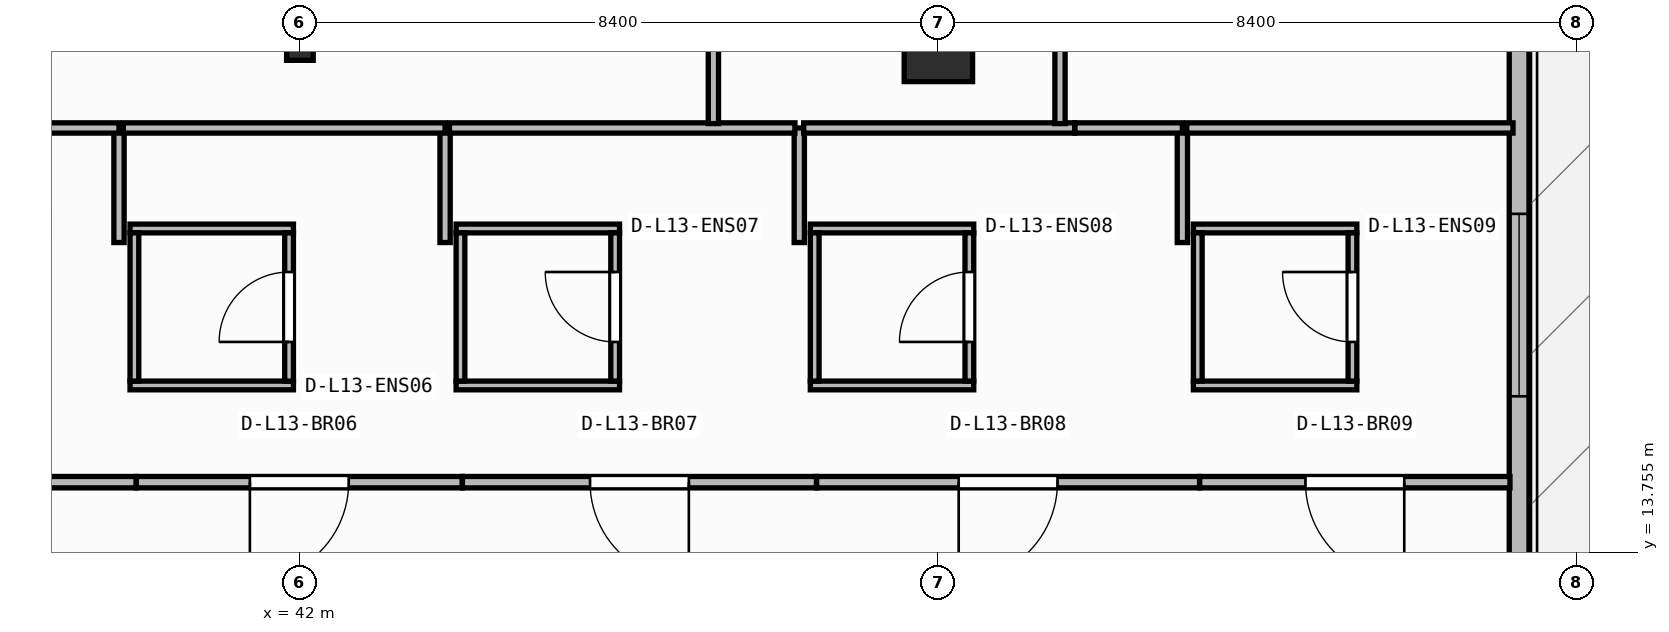
"""IFC4 building model, lengths in metres.
Left out: names, types, materials, properties, quantities, classifications, styles, units other than length and angle.
Written with IfcOpenShell. Run it as: python <this file> out.ifc"""

import sys

from ifc_helpers import new_model, si_unit, direction, frame, frame_2d, origin, origin_2d, place, context, subcontext, project, spatial, rectangle, i_section, extrude, element, fill, save


model = new_model("IFC4")
c1 = context("Model", 3, precision=1e-05, world=origin(), true_north=direction((0.0, 1.0)))
c2 = subcontext(c1, "Body", "Model", "MODEL_VIEW")
j1 = project(units=[si_unit("LENGTHUNIT", "METRE"), si_unit("PLANEANGLEUNIT", "RADIAN")], contexts=[c1])
p1 = place(None, origin())
s1 = spatial("IfcSite", under=j1, at=p1, CompositionType="ELEMENT")
p2 = place(p1, origin())
s2 = spatial("IfcBuilding", under=s1, at=p2, CompositionType="ELEMENT")
p3 = place(p2, frame((0.0, 0.0, 54.1)))
s3 = spatial("IfcBuildingStorey", under=s2, at=p3, CompositionType="ELEMENT", Elevation=54.1)
p4 = place(p3, frame((42.0, 20.4, 0.0), z_axis=(0.0, 0.0, 1.0), x_axis=(1.0, 0.0, 0.0)))
e1 = element("IfcColumn", 1, at=p4, inside=s3, PredefinedType="COLUMN", context=c2, shape_type="SweptSolid", body=[
    extrude(i_section(OverallWidth=0.35, OverallDepth=0.34, WebThickness=0.016, FlangeThickness=0.028, at=origin_2d()), origin(), (0.0, 0.0, 1.0), 3.95),
])
p5 = place(p3, frame((50.4, 20.4, 0.0), z_axis=(0.0, 0.0, 1.0), x_axis=(1.0, 0.0, 0.0)))
e2 = element("IfcColumn", 2, at=p5, inside=s3, PredefinedType="COLUMN", context=c2, shape_type="SweptSolid", body=[
    extrude(rectangle(XDim=0.9, YDim=0.9, at=origin_2d()), origin(), (0.0, 0.0, 1.0), 3.95),
])
p6 = place(p3, frame((58.04, 7.16, 0.0), z_axis=(0.0, 0.0, 1.0), x_axis=(0.0, 1.0, 0.0)))
e3 = element("IfcWall", 3, at=p6, inside=s3, PredefinedType="STANDARD", context=c2, shape_type="SweptSolid", body=[
    extrude(rectangle(XDim=24.48, YDim=0.26, at=frame_2d((12.24, 0.0))), origin(), (0.0, 0.0, 1.0), 3.71),
])
p7 = place(p6, frame((13.44, 0.0, 0.0)))
e4 = element("IfcOpeningElement", 4, at=p7, cuts=e3, PredefinedType="OPENING", context=c2, shape_type="SweptSolid", body=[
    extrude(rectangle(XDim=1.3, YDim=2.15, at=frame_2d((0.65, 1.075))), frame((0.0, 0.14, 0.0), z_axis=(0.0, -1.0, 0.0), x_axis=(1.0, 0.0, 0.0)), (0.0, 0.0, 1.0), 0.28),
])
p8 = place(p6, frame((8.65, 0.0, 0.9)))
e5 = element("IfcOpeningElement", 5, at=p8, cuts=e3, PredefinedType="OPENING", context=c2, shape_type="SweptSolid", body=[
    extrude(rectangle(XDim=2.4, YDim=1.65, at=frame_2d((1.2, 0.825))), frame((0.0, 0.14, 0.0), z_axis=(0.0, -1.0, 0.0), x_axis=(1.0, 0.0, 0.0)), (0.0, 0.0, 1.0), 0.28),
])
p9 = place(p3, frame((39.765, 15.952, 0.0), z_axis=(0.0, 0.0, 1.0), x_axis=(1.0, 0.0, 0.0)))
e6 = element("IfcWall", 6, at=p9, inside=s3, PredefinedType="PARTITIONING", context=c2, shape_type="SweptSolid", body=[
    extrude(rectangle(XDim=2.15, YDim=0.115, at=frame_2d((1.075, 0.0))), origin(), (0.0, 0.0, 1.0), 3.478),
])
p10 = place(p3, frame((39.765, 18.018, 0.0), z_axis=(0.0, 0.0, 1.0), x_axis=(1.0, 0.0, 0.0)))
e7 = element("IfcWall", 7, at=p10, inside=s3, PredefinedType="PARTITIONING", context=c2, shape_type="SweptSolid", body=[
    extrude(rectangle(XDim=2.15, YDim=0.115, at=frame_2d((1.075, 0.0))), origin(), (0.0, 0.0, 1.0), 3.71),
])
p11 = place(p3, frame((39.823, 16.01, 0.0), z_axis=(0.0, 0.0, 1.0), x_axis=(0.0, 1.0, 0.0)))
e8 = element("IfcWall", 8, at=p11, inside=s3, PredefinedType="PARTITIONING", context=c2, shape_type="SweptSolid", body=[
    extrude(rectangle(XDim=1.95, YDim=0.115, at=frame_2d((0.975, 0.0))), origin(), (0.0, 0.0, 1.0), 3.71),
])
p12 = place(p3, frame((41.857, 16.01, 0.0), z_axis=(0.0, 0.0, 1.0), x_axis=(0.0, 1.0, 0.0)))
e9 = element("IfcWall", 9, at=p12, inside=s3, PredefinedType="PARTITIONING", context=c2, shape_type="SweptSolid", body=[
    extrude(rectangle(XDim=1.95, YDim=0.115, at=frame_2d((0.975, 0.0))), origin(), (0.0, 0.0, 1.0), 3.073),
])
p13 = place(p12, frame((0.515, 0.0, 0.0)))
e10 = element("IfcOpeningElement", 10, at=p13, cuts=e9, PredefinedType="OPENING", context=c2, shape_type="SweptSolid", body=[
    extrude(rectangle(XDim=0.92, YDim=2.1, at=frame_2d((0.46, 1.05))), frame((0.0, 0.067, 0.0), z_axis=(0.0, -1.0, 0.0), x_axis=(1.0, 0.0, 0.0)), (0.0, 0.0, 1.0), 0.135),
])
p14 = place(p3, frame((44.055, 15.952, 0.0), z_axis=(0.0, 0.0, 1.0), x_axis=(1.0, 0.0, 0.0)))
e11 = element("IfcWall", 11, at=p14, inside=s3, PredefinedType="PARTITIONING", context=c2, shape_type="SweptSolid", body=[
    extrude(rectangle(XDim=2.15, YDim=0.115, at=frame_2d((1.075, 0.0))), origin(), (0.0, 0.0, 1.0), 3.478),
])
p15 = place(p3, frame((44.055, 18.018, 0.0), z_axis=(0.0, 0.0, 1.0), x_axis=(1.0, 0.0, 0.0)))
e12 = element("IfcWall", 12, at=p15, inside=s3, PredefinedType="PARTITIONING", context=c2, shape_type="SweptSolid", body=[
    extrude(rectangle(XDim=2.15, YDim=0.115, at=frame_2d((1.075, 0.0))), origin(), (0.0, 0.0, 1.0), 3.71),
])
p16 = place(p3, frame((44.113, 16.01, 0.0), z_axis=(0.0, 0.0, 1.0), x_axis=(0.0, 1.0, 0.0)))
e13 = element("IfcWall", 13, at=p16, inside=s3, PredefinedType="PARTITIONING", context=c2, shape_type="SweptSolid", body=[
    extrude(rectangle(XDim=1.95, YDim=0.115, at=frame_2d((0.975, 0.0))), origin(), (0.0, 0.0, 1.0), 3.71),
])
p17 = place(p3, frame((46.147, 16.01, 0.0), z_axis=(0.0, 0.0, 1.0), x_axis=(0.0, 1.0, 0.0)))
e14 = element("IfcWall", 14, at=p17, inside=s3, PredefinedType="PARTITIONING", context=c2, shape_type="SweptSolid", body=[
    extrude(rectangle(XDim=1.95, YDim=0.115, at=frame_2d((0.975, 0.0))), origin(), (0.0, 0.0, 1.0), 3.71),
])
p18 = place(p17, frame((0.515, 0.0, 0.0)))
e15 = element("IfcOpeningElement", 15, at=p18, cuts=e14, PredefinedType="OPENING", context=c2, shape_type="SweptSolid", body=[
    extrude(rectangle(XDim=0.92, YDim=2.1, at=frame_2d((0.46, 1.05))), frame((0.0, 0.067, 0.0), z_axis=(0.0, -1.0, 0.0), x_axis=(1.0, 0.0, 0.0)), (0.0, 0.0, 1.0), 0.135),
])
p19 = place(p3, frame((48.715, 15.952, 0.0), z_axis=(0.0, 0.0, 1.0), x_axis=(1.0, 0.0, 0.0)))
e16 = element("IfcWall", 16, at=p19, inside=s3, PredefinedType="PARTITIONING", context=c2, shape_type="SweptSolid", body=[
    extrude(rectangle(XDim=2.15, YDim=0.115, at=frame_2d((1.075, 0.0))), origin(), (0.0, 0.0, 1.0), 3.478),
])
p20 = place(p3, frame((48.715, 18.018, 0.0), z_axis=(0.0, 0.0, 1.0), x_axis=(1.0, 0.0, 0.0)))
e17 = element("IfcWall", 17, at=p20, inside=s3, PredefinedType="PARTITIONING", context=c2, shape_type="SweptSolid", body=[
    extrude(rectangle(XDim=2.15, YDim=0.115, at=frame_2d((1.075, 0.0))), origin(), (0.0, 0.0, 1.0), 3.71),
])
p21 = place(p3, frame((48.772, 16.01, 0.0), z_axis=(0.0, 0.0, 1.0), x_axis=(0.0, 1.0, 0.0)))
e18 = element("IfcWall", 18, at=p21, inside=s3, PredefinedType="PARTITIONING", context=c2, shape_type="SweptSolid", body=[
    extrude(rectangle(XDim=1.95, YDim=0.115, at=frame_2d((0.975, 0.0))), origin(), (0.0, 0.0, 1.0), 3.71),
])
p22 = place(p3, frame((50.808, 16.01, 0.0), z_axis=(0.0, 0.0, 1.0), x_axis=(0.0, 1.0, 0.0)))
e19 = element("IfcWall", 19, at=p22, inside=s3, PredefinedType="PARTITIONING", context=c2, shape_type="SweptSolid", body=[
    extrude(rectangle(XDim=1.95, YDim=0.115, at=frame_2d((0.975, 0.0))), origin(), (0.0, 0.0, 1.0), 3.073),
])
p23 = place(p22, frame((0.515, 0.0, 0.0)))
e20 = element("IfcOpeningElement", 20, at=p23, cuts=e19, PredefinedType="OPENING", context=c2, shape_type="SweptSolid", body=[
    extrude(rectangle(XDim=0.92, YDim=2.1, at=frame_2d((0.46, 1.05))), frame((0.0, 0.067, 0.0), z_axis=(0.0, -1.0, 0.0), x_axis=(1.0, 0.0, 0.0)), (0.0, 0.0, 1.0), 0.135),
])
for number, where, z_axis, x_axis in (
    (21, (53.755, 15.952, 0.0), (0.0, 0.0, 1.0), (1.0, 0.0, 0.0)),
    (22, (53.755, 18.018, 0.0), (0.0, 0.0, 1.0), (1.0, 0.0, 0.0)),
):
    element("IfcWall", number, at=place(p3, frame(where, z_axis=z_axis, x_axis=x_axis)), inside=s3, PredefinedType="PARTITIONING", context=c2, shape_type="SweptSolid", body=[
        extrude(rectangle(XDim=2.15, YDim=0.115, at=frame_2d((1.075, 0.0))), origin(), (0.0, 0.0, 1.0), 3.71),
    ])
p24 = place(p3, frame((53.812, 16.01, 0.0), z_axis=(0.0, 0.0, 1.0), x_axis=(0.0, 1.0, 0.0)))
e23 = element("IfcWall", 23, at=p24, inside=s3, PredefinedType="PARTITIONING", context=c2, shape_type="SweptSolid", body=[
    extrude(rectangle(XDim=1.95, YDim=0.115, at=frame_2d((0.975, 0.0))), origin(), (0.0, 0.0, 1.0), 3.71),
])
p25 = place(p3, frame((55.847, 16.01, 0.0), z_axis=(0.0, 0.0, 1.0), x_axis=(0.0, 1.0, 0.0)))
e24 = element("IfcWall", 24, at=p25, inside=s3, PredefinedType="PARTITIONING", context=c2, shape_type="SweptSolid", body=[
    extrude(rectangle(XDim=1.95, YDim=0.115, at=frame_2d((0.975, 0.0))), origin(), (0.0, 0.0, 1.0), 3.71),
])
p26 = place(p25, frame((0.515, 0.0, 0.0)))
e25 = element("IfcOpeningElement", 25, at=p26, cuts=e24, PredefinedType="OPENING", context=c2, shape_type="SweptSolid", body=[
    extrude(rectangle(XDim=0.92, YDim=2.1, at=frame_2d((0.46, 1.05))), frame((0.0, 0.067, 0.0), z_axis=(0.0, -1.0, 0.0), x_axis=(1.0, 0.0, 0.0)), (0.0, 0.0, 1.0), 0.135),
])
p27 = place(p3, frame((39.846, 14.68, 0.0), z_axis=(0.0, 0.0, 1.0), x_axis=(-1.0, 0.0, 0.0)))
e26 = element("IfcWall", 26, at=p27, inside=s3, PredefinedType="PARTITIONING", context=c2, shape_type="SweptSolid", body=[
    extrude(rectangle(XDim=5.038, YDim=0.15, at=frame_2d((2.519, 0.0))), origin(), (0.0, 0.0, 1.0), 3.71),
])
p28 = place(p27, frame((1.869, 0.0, 0.0)))
e27 = element("IfcOpeningElement", 27, at=p28, cuts=e26, PredefinedType="OPENING", context=c2, shape_type="SweptSolid", body=[
    extrude(rectangle(XDim=1.3, YDim=2.15, at=frame_2d((0.65, 1.075))), frame((0.0, 0.085, 0.0), z_axis=(0.0, -1.0, 0.0), x_axis=(1.0, 0.0, 0.0)), (0.0, 0.0, 1.0), 0.17),
])
p29 = place(p3, frame((44.136, 14.68, 0.0), z_axis=(0.0, 0.0, 1.0), x_axis=(-1.0, 0.0, 0.0)))
e28 = element("IfcWall", 28, at=p29, inside=s3, PredefinedType="PARTITIONING", context=c2, shape_type="SweptSolid", body=[
    extrude(rectangle(XDim=4.288, YDim=0.15, at=frame_2d((2.144, 0.0))), origin(), (0.0, 0.0, 1.0), 3.71),
])
p30 = place(p29, frame((1.494, 0.0, 0.0)))
e29 = element("IfcOpeningElement", 29, at=p30, cuts=e28, PredefinedType="OPENING", context=c2, shape_type="SweptSolid", body=[
    extrude(rectangle(XDim=1.3, YDim=2.15, at=frame_2d((0.65, 1.075))), frame((0.0, 0.085, 0.0), z_axis=(0.0, -1.0, 0.0), x_axis=(1.0, 0.0, 0.0)), (0.0, 0.0, 1.0), 0.17),
])
p31 = place(p3, frame((48.796, 14.68, 0.0), z_axis=(0.0, 0.0, 1.0), x_axis=(-1.0, 0.0, 0.0)))
e30 = element("IfcWall", 30, at=p31, inside=s3, PredefinedType="PARTITIONING", context=c2, shape_type="SweptSolid", body=[
    extrude(rectangle(XDim=4.658, YDim=0.15, at=frame_2d((2.329, 0.0))), origin(), (0.0, 0.0, 1.0), 3.71),
])
p32 = place(p31, frame((1.679, 0.0, 0.0)))
e31 = element("IfcOpeningElement", 31, at=p32, cuts=e30, PredefinedType="OPENING", context=c2, shape_type="SweptSolid", body=[
    extrude(rectangle(XDim=1.3, YDim=2.15, at=frame_2d((0.65, 1.075))), frame((0.0, 0.085, 0.0), z_axis=(0.0, -1.0, 0.0), x_axis=(1.0, 0.0, 0.0)), (0.0, 0.0, 1.0), 0.17),
])
p33 = place(p3, frame((53.836, 14.68, 0.0), z_axis=(0.0, 0.0, 1.0), x_axis=(-1.0, 0.0, 0.0)))
e32 = element("IfcWall", 32, at=p33, inside=s3, PredefinedType="PARTITIONING", context=c2, shape_type="SweptSolid", body=[
    extrude(rectangle(XDim=5.038, YDim=0.15, at=frame_2d((2.519, 0.0))), origin(), (0.0, 0.0, 1.0), 3.71),
])
p34 = place(p33, frame((1.869, 0.0, 0.0)))
e33 = element("IfcOpeningElement", 33, at=p34, cuts=e32, PredefinedType="OPENING", context=c2, shape_type="SweptSolid", body=[
    extrude(rectangle(XDim=1.3, YDim=2.15, at=frame_2d((0.65, 1.075))), frame((0.0, 0.085, 0.0), z_axis=(0.0, -1.0, 0.0), x_axis=(1.0, 0.0, 0.0)), (0.0, 0.0, 1.0), 0.17),
])
p35 = place(p3, frame((57.92, 14.68, 0.0), z_axis=(0.0, 0.0, 1.0), x_axis=(-1.0, 0.0, 0.0)))
e34 = element("IfcWall", 34, at=p35, inside=s3, PredefinedType="PARTITIONING", context=c2, shape_type="SweptSolid", body=[
    extrude(rectangle(XDim=4.082, YDim=0.15, at=frame_2d((2.041, 0.0))), origin(), (0.0, 0.0, 1.0), 3.71),
])
p36 = place(p35, frame((1.391, 0.0, 0.0)))
e35 = element("IfcOpeningElement", 35, at=p36, cuts=e34, PredefinedType="OPENING", context=c2, shape_type="SweptSolid", body=[
    extrude(rectangle(XDim=1.3, YDim=2.15, at=frame_2d((0.65, 1.075))), frame((0.0, 0.085, 0.0), z_axis=(0.0, -1.0, 0.0), x_axis=(1.0, 0.0, 0.0)), (0.0, 0.0, 1.0), 0.17),
])
p37 = place(p3, frame((39.62, 17.833, 0.0), z_axis=(0.0, 0.0, 1.0), x_axis=(0.0, 1.0, 0.0)))
e36 = element("IfcWall", 36, at=p37, inside=s3, PredefinedType="PARTITIONING", context=c2, shape_type="SweptSolid", body=[
    extrude(rectangle(XDim=1.508, YDim=0.135, at=frame_2d((0.754, 0.0))), origin(), (0.0, 0.0, 1.0), 3.71),
])
p38 = place(p3, frame((39.62, 19.34, 0.0), z_axis=(0.0, 0.0, 1.0), x_axis=(-1.0, 0.0, 0.0)))
e37 = element("IfcWall", 37, at=p38, inside=s3, PredefinedType="PARTITIONING", context=c2, shape_type="SweptSolid", body=[
    extrude(rectangle(XDim=1.414, YDim=0.135, at=frame_2d((0.707, 0.0))), origin(), (0.0, 0.0, 1.0), 3.71),
])
p39 = place(p3, frame((43.91, 17.833, 0.0), z_axis=(0.0, 0.0, 1.0), x_axis=(0.0, 1.0, 0.0)))
e38 = element("IfcWall", 38, at=p39, inside=s3, PredefinedType="PARTITIONING", context=c2, shape_type="SweptSolid", body=[
    extrude(rectangle(XDim=1.508, YDim=0.135, at=frame_2d((0.754, 0.0))), origin(), (0.0, 0.0, 1.0), 3.71),
])
p40 = place(p3, frame((43.91, 19.34, 0.0), z_axis=(0.0, 0.0, 1.0), x_axis=(-1.0, 0.0, 0.0)))
e39 = element("IfcWall", 39, at=p40, inside=s3, PredefinedType="PARTITIONING", context=c2, shape_type="SweptSolid", body=[
    extrude(rectangle(XDim=4.232, YDim=0.135, at=frame_2d((2.116, 0.0))), origin(), (0.0, 0.0, 1.0), 3.71),
])
p41 = place(p3, frame((48.57, 17.833, 0.0), z_axis=(0.0, 0.0, 1.0), x_axis=(0.0, 1.0, 0.0)))
e40 = element("IfcWall", 40, at=p41, inside=s3, PredefinedType="PARTITIONING", context=c2, shape_type="SweptSolid", body=[
    extrude(rectangle(XDim=1.508, YDim=0.135, at=frame_2d((0.754, 0.0))), origin(), (0.0, 0.0, 1.0), 3.71),
])
p42 = place(p3, frame((48.512, 19.34, 0.0), z_axis=(0.0, 0.0, 1.0), x_axis=(-1.0, 0.0, 0.0)))
e41 = element("IfcWall", 41, at=p42, inside=s3, PredefinedType="PARTITIONING", context=c2, shape_type="SweptSolid", body=[
    extrude(rectangle(XDim=4.545, YDim=0.135, at=frame_2d((2.272, 0.0))), origin(), (0.0, 0.0, 1.0), 3.71),
])
p43 = place(p3, frame((53.61, 17.833, 0.0), z_axis=(0.0, 0.0, 1.0), x_axis=(0.0, 1.0, 0.0)))
e42 = element("IfcWall", 42, at=p43, inside=s3, PredefinedType="PARTITIONING", context=c2, shape_type="SweptSolid", body=[
    extrude(rectangle(XDim=1.508, YDim=0.135, at=frame_2d((0.754, 0.0))), origin(), (0.0, 0.0, 1.0), 3.71),
])
p44 = place(p3, frame((52.195, 19.34, 0.0), z_axis=(0.0, 0.0, 1.0), x_axis=(-1.0, 0.0, 0.0)))
e43 = element("IfcWall", 43, at=p44, inside=s3, PredefinedType="PARTITIONING", context=c2, shape_type="SweptSolid", body=[
    extrude(rectangle(XDim=3.567, YDim=0.135, at=frame_2d((1.784, 0.0))), origin(), (0.0, 0.0, 1.0), 3.71),
])
p45 = place(p3, frame((53.61, 19.34, 0.0), z_axis=(0.0, 0.0, 1.0), x_axis=(-1.0, 0.0, 0.0)))
e44 = element("IfcWall", 44, at=p45, inside=s3, PredefinedType="PARTITIONING", context=c2, shape_type="SweptSolid", body=[
    extrude(rectangle(XDim=1.414, YDim=0.135, at=frame_2d((0.707, 0.0))), origin(), (0.0, 0.0, 1.0), 3.71),
])
p46 = place(p3, frame((57.96, 19.34, 0.0), z_axis=(0.0, 0.0, 1.0), x_axis=(-1.0, 0.0, 0.0)))
e45 = element("IfcWall", 45, at=p46, inside=s3, PredefinedType="PARTITIONING", context=c2, shape_type="SweptSolid", body=[
    extrude(rectangle(XDim=4.292, YDim=0.135, at=frame_2d((2.146, 0.0))), origin(), (0.0, 0.0, 1.0), 3.71),
])
p47 = place(p3, frame((47.44, 19.397, 0.0), z_axis=(0.0, 0.0, 1.0), x_axis=(0.0, 1.0, 0.0)))
e46 = element("IfcWall", 46, at=p47, inside=s3, PredefinedType="PARTITIONING", context=c2, shape_type="SweptSolid", body=[
    extrude(rectangle(XDim=9.522, YDim=0.135, at=frame_2d((4.761, 0.0))), origin(), (0.0, 0.0, 1.0), 3.71),
])
p48 = place(p47, frame((4.211, 0.0, 0.0)))
e47 = element("IfcOpeningElement", 47, at=p48, cuts=e46, PredefinedType="OPENING", context=c2, shape_type="SweptSolid", body=[
    extrude(rectangle(XDim=1.1, YDim=2.1, at=frame_2d((0.55, 1.05))), frame((0.0, 0.077, 0.0), z_axis=(0.0, -1.0, 0.0), x_axis=(1.0, 0.0, 0.0)), (0.0, 0.0, 1.0), 0.155),
])
p49 = place(p3, frame((52.0, 19.397, 0.0), z_axis=(0.0, 0.0, 1.0), x_axis=(0.0, 1.0, 0.0)))
e48 = element("IfcWall", 48, at=p49, inside=s3, PredefinedType="PARTITIONING", context=c2, shape_type="SweptSolid", body=[
    extrude(rectangle(XDim=9.522, YDim=0.135, at=frame_2d((4.761, 0.0))), origin(), (0.0, 0.0, 1.0), 3.71),
])
p50 = place(p49, frame((4.612, 0.0, 0.0)))
e49 = element("IfcOpeningElement", 49, at=p50, cuts=e48, PredefinedType="OPENING", context=c2, shape_type="SweptSolid", body=[
    extrude(rectangle(XDim=1.1, YDim=2.1, at=frame_2d((0.55, 1.05))), frame((0.0, 0.077, 0.0), z_axis=(0.0, -1.0, 0.0), x_axis=(1.0, 0.0, 0.0)), (0.0, 0.0, 1.0), 0.155),
])
p51 = place(p13, origin())
e50 = element("IfcDoor", 50, at=p51, inside=s3, OperationType="SINGLE_SWING_LEFT", PredefinedType="DOOR", context=c2, shape_type="SweptSolid", body=[
    extrude(rectangle(XDim=0.92, YDim=2.1, at=frame_2d((0.46, 1.05))), frame((0.0, 0.025, 0.0), z_axis=(0.0, -1.0, 0.0), x_axis=(1.0, 0.0, 0.0)), (0.0, 0.0, 1.0), 0.05),
])
fill(e10, e50)
p52 = place(p18, origin())
e51 = element("IfcDoor", 51, at=p52, inside=s3, OperationType="SINGLE_SWING_RIGHT", PredefinedType="DOOR", context=c2, shape_type="SweptSolid", body=[
    extrude(rectangle(XDim=0.92, YDim=2.1, at=frame_2d((0.46, 1.05))), frame((0.0, 0.025, 0.0), z_axis=(0.0, -1.0, 0.0), x_axis=(1.0, 0.0, 0.0)), (0.0, 0.0, 1.0), 0.05),
])
fill(e15, e51)
p53 = place(p23, origin())
e52 = element("IfcDoor", 52, at=p53, inside=s3, OperationType="SINGLE_SWING_LEFT", PredefinedType="DOOR", context=c2, shape_type="SweptSolid", body=[
    extrude(rectangle(XDim=0.92, YDim=2.1, at=frame_2d((0.46, 1.05))), frame((0.0, 0.025, 0.0), z_axis=(0.0, -1.0, 0.0), x_axis=(1.0, 0.0, 0.0)), (0.0, 0.0, 1.0), 0.05),
])
fill(e20, e52)
p54 = place(p26, origin())
e53 = element("IfcDoor", 53, at=p54, inside=s3, OperationType="SINGLE_SWING_RIGHT", PredefinedType="DOOR", context=c2, shape_type="SweptSolid", body=[
    extrude(rectangle(XDim=0.92, YDim=2.1, at=frame_2d((0.46, 1.05))), frame((0.0, 0.025, 0.0), z_axis=(0.0, -1.0, 0.0), x_axis=(1.0, 0.0, 0.0)), (0.0, 0.0, 1.0), 0.05),
])
fill(e25, e53)
p55 = place(p30, origin())
e54 = element("IfcDoor", 54, at=p55, inside=s3, OperationType="SINGLE_SWING_RIGHT", PredefinedType="DOOR", context=c2, shape_type="SweptSolid", body=[
    extrude(rectangle(XDim=1.3, YDim=2.15, at=frame_2d((0.65, 1.075))), frame((0.0, 0.025, 0.0), z_axis=(0.0, -1.0, 0.0), x_axis=(1.0, 0.0, 0.0)), (0.0, 0.0, 1.0), 0.05),
])
fill(e29, e54)
p56 = place(p32, origin())
e55 = element("IfcDoor", 55, at=p56, inside=s3, OperationType="SINGLE_SWING_LEFT", PredefinedType="DOOR", context=c2, shape_type="SweptSolid", body=[
    extrude(rectangle(XDim=1.3, YDim=2.15, at=frame_2d((0.65, 1.075))), frame((0.0, 0.025, 0.0), z_axis=(0.0, -1.0, 0.0), x_axis=(1.0, 0.0, 0.0)), (0.0, 0.0, 1.0), 0.05),
])
fill(e31, e55)
p57 = place(p34, origin())
e56 = element("IfcDoor", 56, at=p57, inside=s3, OperationType="SINGLE_SWING_RIGHT", PredefinedType="DOOR", context=c2, shape_type="SweptSolid", body=[
    extrude(rectangle(XDim=1.3, YDim=2.15, at=frame_2d((0.65, 1.075))), frame((0.0, 0.025, 0.0), z_axis=(0.0, -1.0, 0.0), x_axis=(1.0, 0.0, 0.0)), (0.0, 0.0, 1.0), 0.05),
])
fill(e33, e56)
p58 = place(p36, origin())
e57 = element("IfcDoor", 57, at=p58, inside=s3, OperationType="SINGLE_SWING_LEFT", PredefinedType="DOOR", context=c2, shape_type="SweptSolid", body=[
    extrude(rectangle(XDim=1.3, YDim=2.15, at=frame_2d((0.65, 1.075))), frame((0.0, 0.025, 0.0), z_axis=(0.0, -1.0, 0.0), x_axis=(1.0, 0.0, 0.0)), (0.0, 0.0, 1.0), 0.05),
])
fill(e35, e57)
p59 = place(p8, origin())
e58 = element("IfcWindow", 58, at=p59, inside=s3, PartitioningType="SINGLE_PANEL", PredefinedType="WINDOW", context=c2, shape_type="SweptSolid", body=[
    extrude(rectangle(XDim=2.4, YDim=1.65, at=frame_2d((1.2, 0.825))), frame((0.0, 0.03, 0.0), z_axis=(0.0, -1.0, 0.0), x_axis=(1.0, 0.0, 0.0)), (0.0, 0.0, 1.0), 0.06),
])
fill(e5, e58)
save(model, sys.argv[1])
